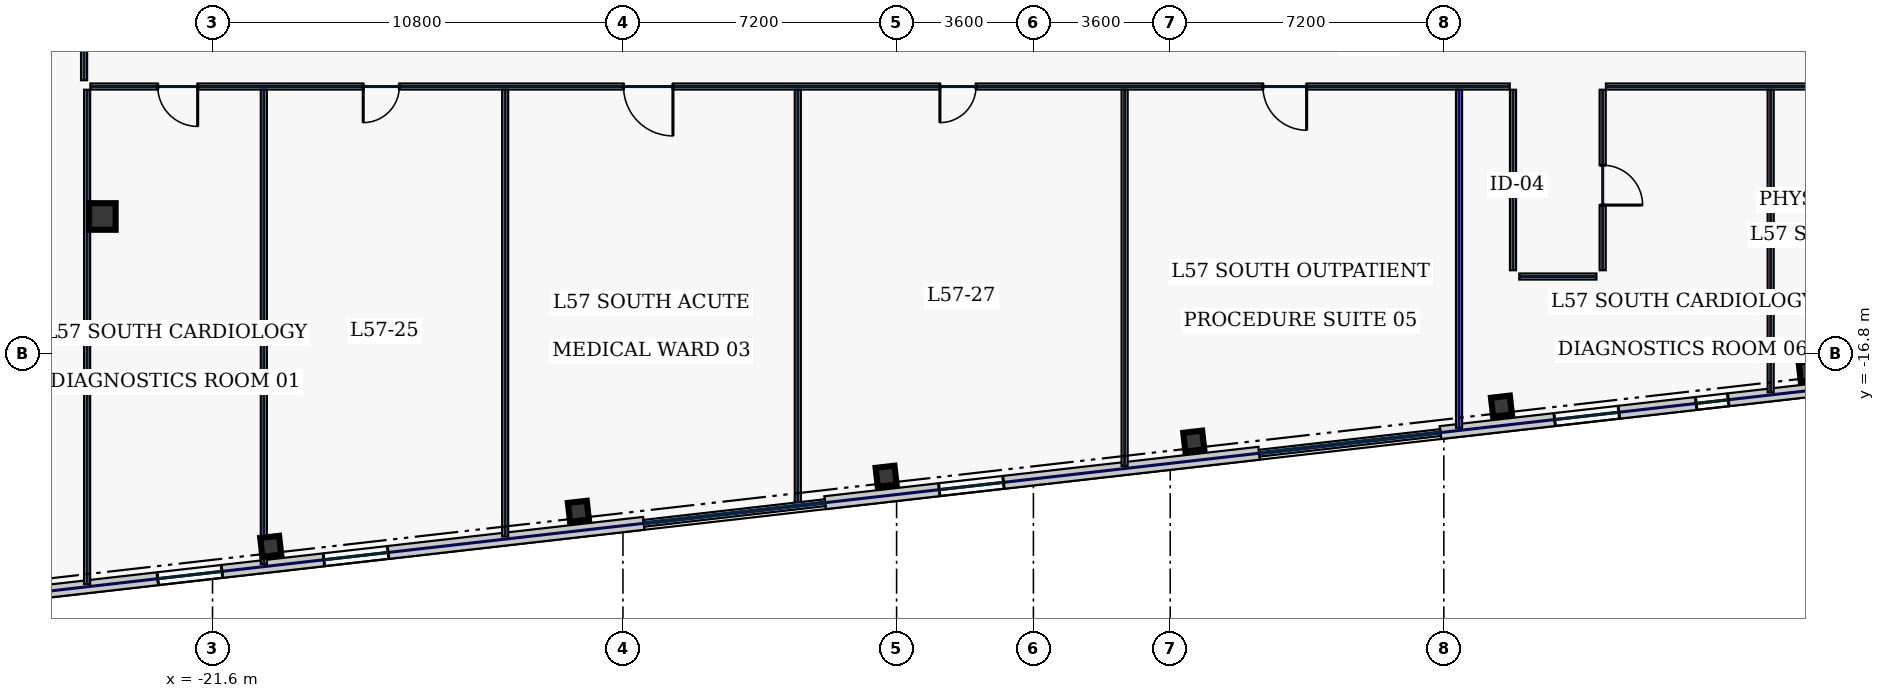
"""IFC4 building model, lengths in metres.
Left out: names, types, materials, properties, quantities, classifications, styles, units other than length and angle.
Written with IfcOpenShell. Run it as: python <this file> out.ifc"""

import sys

from ifc_helpers import new_model, si_unit, direction, frame, frame_2d, origin, origin_2d, place, context, subcontext, project, spatial, rectangle, hollow_rectangle, extrude, element, fill, save


model = new_model("IFC4")
c1 = context("Model", 3, precision=1e-05, world=origin(), true_north=direction((0.0, 1.0)))
c2 = subcontext(c1, "Body", "Model", "MODEL_VIEW")
j1 = project(units=[si_unit("LENGTHUNIT", "METRE"), si_unit("PLANEANGLEUNIT", "RADIAN")], contexts=[c1])
p1 = place(None, origin())
s1 = spatial("IfcSite", under=j1, at=p1, CompositionType="ELEMENT")
p2 = place(p1, origin())
s2 = spatial("IfcBuilding", under=s1, at=p2, CompositionType="ELEMENT")
p3 = place(p2, frame((0.0, 0.0, 247.0)))
s3 = spatial("IfcBuildingStorey", under=s2, at=p3, CompositionType="ELEMENT", Elevation=247.0)
p4 = place(p3, frame((-24.5, -13.2, 0.0), z_axis=(0.0, 0.0, 1.0), x_axis=(1.0, 0.0, 0.0)))
e1 = element("IfcColumn", 1, at=p4, inside=s3, PredefinedType="COLUMN", context=c2, shape_type="SweptSolid", body=[
    extrude(hollow_rectangle(XDim=0.7, YDim=0.7, WallThickness=0.032, at=origin_2d()), origin(), (0.0, 0.0, 1.0), 3.74),
])
for number, where, z_axis, x_axis in (
    (2, (-20.069, -21.88, 0.0), (0.0, 0.0, 1.0), (0.994, 0.113, 0.0)),
    (3, (-11.972, -20.958, 0.0), (0.0, 0.0, 1.0), (0.994, 0.113, 0.0)),
    (4, (-3.876, -20.035, 0.0), (0.0, 0.0, 1.0), (0.994, 0.113, 0.0)),
    (5, (4.22, -19.113, 0.0), (0.0, 0.0, 1.0), (0.994, 0.113, 0.0)),
    (6, (12.316, -18.19, 0.0), (0.0, 0.0, 1.0), (0.994, 0.113, 0.0)),
    (7, (20.412, -17.268, 0.0), (0.0, 0.0, 1.0), (0.994, 0.113, 0.0)),
):
    element("IfcColumn", number, at=place(p3, frame(where, z_axis=z_axis, x_axis=x_axis)), inside=s3, PredefinedType="COLUMN", context=c2, shape_type="SweptSolid", body=[
        extrude(hollow_rectangle(XDim=0.5, YDim=0.5, WallThickness=0.025, at=origin_2d()), origin(), (0.0, 0.0, 1.0), 3.74),
    ])
p5 = place(p3, frame((-28.783, -23.386, 0.0), z_axis=(0.0, 0.0, 1.0), x_axis=(0.993572271362, 0.113199565282, 0.0)))
e8 = element("IfcWall", 8, at=p5, inside=s3, PredefinedType="STANDARD", context=c2, shape_type="SweptSolid", body=[
    extrude(rectangle(XDim=18.651, YDim=0.34, at=frame_2d((9.326, 0.0))), origin(), (0.0, 0.0, 1.0), 3.74),
])
p6 = place(p5, frame((2.03, 0.0, 0.88)))
e9 = element("IfcOpeningElement", 9, at=p6, cuts=e8, PredefinedType="OPENING", context=c2, shape_type="SweptSolid", body=[
    extrude(rectangle(XDim=0.85, YDim=1.85, at=frame_2d((0.425, 0.925))), frame((0.0, 0.18, 0.0), z_axis=(0.0, -1.0, 0.0), x_axis=(1.0, 0.0, 0.0)), (0.0, 0.0, 1.0), 0.36),
])
p7 = place(p5, frame((5.779, 0.0, 0.88)))
e10 = element("IfcOpeningElement", 10, at=p7, cuts=e8, PredefinedType="OPENING", context=c2, shape_type="SweptSolid", body=[
    extrude(rectangle(XDim=1.7, YDim=1.95, at=frame_2d((0.85, 0.975))), frame((0.0, 0.18, 0.0), z_axis=(0.0, -1.0, 0.0), x_axis=(1.0, 0.0, 0.0)), (0.0, 0.0, 1.0), 0.36),
])
p8 = place(p5, frame((10.179, 0.0, 0.88)))
e11 = element("IfcOpeningElement", 11, at=p8, cuts=e8, PredefinedType="OPENING", context=c2, shape_type="SweptSolid", body=[
    extrude(rectangle(XDim=1.7, YDim=1.95, at=frame_2d((0.85, 0.975))), frame((0.0, 0.18, 0.0), z_axis=(0.0, -1.0, 0.0), x_axis=(1.0, 0.0, 0.0)), (0.0, 0.0, 1.0), 0.36),
])
p9 = place(p3, frame((-5.482, -20.731, 0.0), z_axis=(0.0, 0.0, 1.0), x_axis=(0.993571968199, 0.113202226169, 0.0)))
e12 = element("IfcWall", 12, at=p9, inside=s3, PredefinedType="STANDARD", context=c2, shape_type="SweptSolid", body=[
    extrude(rectangle(XDim=11.497, YDim=0.34, at=frame_2d((5.749, 0.0))), origin(), (0.0, 0.0, 1.0), 3.74),
])
p10 = place(p9, frame((3.024, 0.0, 0.88)))
e13 = element("IfcOpeningElement", 13, at=p10, cuts=e12, PredefinedType="OPENING", context=c2, shape_type="SweptSolid", body=[
    extrude(rectangle(XDim=1.7, YDim=1.95, at=frame_2d((0.85, 0.975))), frame((0.0, 0.18, 0.0), z_axis=(0.0, -1.0, 0.0), x_axis=(1.0, 0.0, 0.0)), (0.0, 0.0, 1.0), 0.36),
])
p11 = place(p3, frame((10.71, -18.886, 0.0), z_axis=(0.0, 0.0, 1.0), x_axis=(0.993572271362, 0.113199565282, 0.0)))
e14 = element("IfcWall", 14, at=p11, inside=s3, PredefinedType="STANDARD", context=c2, shape_type="SweptSolid", body=[
    extrude(rectangle(XDim=18.651, YDim=0.34, at=frame_2d((9.326, 0.0))), origin(), (0.0, 0.0, 1.0), 3.74),
])
p12 = place(p11, frame((3.024, 0.0, 0.88)))
e15 = element("IfcOpeningElement", 15, at=p12, cuts=e14, PredefinedType="OPENING", context=c2, shape_type="SweptSolid", body=[
    extrude(rectangle(XDim=1.7, YDim=1.95, at=frame_2d((0.85, 0.975))), frame((0.0, 0.18, 0.0), z_axis=(0.0, -1.0, 0.0), x_axis=(1.0, 0.0, 0.0)), (0.0, 0.0, 1.0), 0.36),
])
p13 = place(p11, frame((6.773, 0.0, 0.88)))
e16 = element("IfcOpeningElement", 16, at=p13, cuts=e14, PredefinedType="OPENING", context=c2, shape_type="SweptSolid", body=[
    extrude(rectangle(XDim=0.85, YDim=1.85, at=frame_2d((0.425, 0.925))), frame((0.0, 0.18, 0.0), z_axis=(0.0, -1.0, 0.0), x_axis=(1.0, 0.0, 0.0)), (0.0, 0.0, 1.0), 0.36),
])
p14 = place(p11, frame((11.173, 0.0, 0.88)))
e17 = element("IfcOpeningElement", 17, at=p14, cuts=e14, PredefinedType="OPENING", context=c2, shape_type="SweptSolid", body=[
    extrude(rectangle(XDim=1.7, YDim=1.95, at=frame_2d((0.85, 0.975))), frame((0.0, 0.18, 0.0), z_axis=(0.0, -1.0, 0.0), x_axis=(1.0, 0.0, 0.0)), (0.0, 0.0, 1.0), 0.36),
])
p15 = place(p11, frame((14.921, 0.0, 0.88)))
e18 = element("IfcOpeningElement", 18, at=p15, cuts=e14, PredefinedType="OPENING", context=c2, shape_type="SweptSolid", body=[
    extrude(rectangle(XDim=1.7, YDim=1.95, at=frame_2d((0.85, 0.975))), frame((0.0, 0.18, 0.0), z_axis=(0.0, -1.0, 0.0), x_axis=(1.0, 0.0, 0.0)), (0.0, 0.0, 1.0), 0.36),
])
p16 = place(p3, frame((-24.98, -9.615, 0.0), z_axis=(0.0, 0.0, 1.0), x_axis=(0.0, 1.0, 0.0)))
e19 = element("IfcWall", 19, at=p16, inside=s3, PredefinedType="PARTITIONING", context=c2, shape_type="SweptSolid", body=[
    extrude(rectangle(XDim=19.28, YDim=0.16, at=frame_2d((9.64, 0.0))), origin(), (0.0, 0.0, 1.0), 3.74),
])
p17 = place(p16, frame((1.969, 0.0, 0.0)))
e20 = element("IfcOpeningElement", 20, at=p17, cuts=e19, PredefinedType="OPENING", context=c2, shape_type="SweptSolid", body=[
    extrude(rectangle(XDim=0.95, YDim=2.2, at=frame_2d((0.475, 1.1))), frame((0.0, 0.09, 0.0), z_axis=(0.0, -1.0, 0.0), x_axis=(1.0, 0.0, 0.0)), (0.0, 0.0, 1.0), 0.18),
])
p18 = place(p16, frame((6.625, 0.0, 0.0)))
e21 = element("IfcOpeningElement", 21, at=p18, cuts=e19, PredefinedType="OPENING", context=c2, shape_type="SweptSolid", body=[
    extrude(rectangle(XDim=0.95, YDim=2.2, at=frame_2d((0.475, 1.1))), frame((0.0, 0.09, 0.0), z_axis=(0.0, -1.0, 0.0), x_axis=(1.0, 0.0, 0.0)), (0.0, 0.0, 1.0), 0.18),
])
p19 = place(p16, frame((11.825, 0.0, 0.0)))
e22 = element("IfcOpeningElement", 22, at=p19, cuts=e19, PredefinedType="OPENING", context=c2, shape_type="SweptSolid", body=[
    extrude(rectangle(XDim=0.95, YDim=2.2, at=frame_2d((0.475, 1.1))), frame((0.0, 0.09, 0.0), z_axis=(0.0, -1.0, 0.0), x_axis=(1.0, 0.0, 0.0)), (0.0, 0.0, 1.0), 0.18),
])
p20 = place(p16, frame((16.506, 0.0, 0.0)))
e23 = element("IfcOpeningElement", 23, at=p20, cuts=e19, PredefinedType="OPENING", context=c2, shape_type="SweptSolid", body=[
    extrude(rectangle(XDim=0.95, YDim=2.2, at=frame_2d((0.475, 1.1))), frame((0.0, 0.09, 0.0), z_axis=(0.0, -1.0, 0.0), x_axis=(1.0, 0.0, 0.0)), (0.0, 0.0, 1.0), 0.18),
])
p21 = place(p3, frame((24.815, -9.78, 0.0), z_axis=(0.0, 0.0, 1.0), x_axis=(-1.0, 0.0, 0.0)))
e24 = element("IfcWall", 24, at=p21, inside=s3, PredefinedType="PARTITIONING", context=c2, shape_type="SweptSolid", body=[
    extrude(rectangle(XDim=9.75, YDim=0.16, at=frame_2d((4.875, 0.0))), origin(), (0.0, 0.0, 1.0), 3.74),
])
p22 = place(p21, frame((2.469, 0.0, 0.0)))
e25 = element("IfcOpeningElement", 25, at=p22, cuts=e24, PredefinedType="OPENING", context=c2, shape_type="SweptSolid", body=[
    extrude(rectangle(XDim=0.95, YDim=2.2, at=frame_2d((0.475, 1.1))), frame((0.0, 0.09, 0.0), z_axis=(0.0, -1.0, 0.0), x_axis=(1.0, 0.0, 0.0)), (0.0, 0.0, 1.0), 0.18),
])
p23 = place(p3, frame((14.98, -9.865, 0.0), z_axis=(0.0, 0.0, 1.0), x_axis=(0.0, -1.0, 0.0)))
e26 = element("IfcWall", 26, at=p23, inside=s3, PredefinedType="PARTITIONING", context=c2, shape_type="SweptSolid", body=[
    extrude(rectangle(XDim=4.75, YDim=0.16, at=frame_2d((2.375, 0.0))), origin(), (0.0, 0.0, 1.0), 3.74),
])
p24 = place(p23, frame((1.985, 0.0, 0.0)))
e27 = element("IfcOpeningElement", 27, at=p24, cuts=e26, PredefinedType="OPENING", context=c2, shape_type="SweptSolid", body=[
    extrude(rectangle(XDim=1.05, YDim=2.2, at=frame_2d((0.525, 1.1))), frame((0.0, 0.09, 0.0), z_axis=(0.0, -1.0, 0.0), x_axis=(1.0, 0.0, 0.0)), (0.0, 0.0, 1.0), 0.18),
])
p25 = place(p3, frame((14.815, -14.78, 0.0), z_axis=(0.0, 0.0, 1.0), x_axis=(-1.0, 0.0, 0.0)))
e28 = element("IfcWall", 28, at=p25, inside=s3, PredefinedType="PARTITIONING", context=c2, shape_type="SweptSolid", body=[
    extrude(rectangle(XDim=2.03, YDim=0.16, at=frame_2d((1.015, 0.0))), origin(), (0.0, 0.0, 1.0), 3.74),
])
p26 = place(p3, frame((12.62, -14.615, 0.0), z_axis=(0.0, 0.0, 1.0), x_axis=(0.0, 1.0, 0.0)))
e29 = element("IfcWall", 29, at=p26, inside=s3, PredefinedType="PARTITIONING", context=c2, shape_type="SweptSolid", body=[
    extrude(rectangle(XDim=4.75, YDim=0.16, at=frame_2d((2.375, 0.0))), origin(), (0.0, 0.0, 1.0), 3.74),
])
p27 = place(p3, frame((12.535, -9.78, 0.0), z_axis=(0.0, 0.0, 1.0), x_axis=(-1.0, 0.0, 0.0)))
e30 = element("IfcWall", 30, at=p27, inside=s3, PredefinedType="PARTITIONING", context=c2, shape_type="SweptSolid", body=[
    extrude(rectangle(XDim=37.35, YDim=0.16, at=frame_2d((18.675, 0.0))), origin(), (0.0, 0.0, 1.0), 3.74),
])
p28 = place(p27, frame((34.526, 0.0, 0.0)))
e31 = element("IfcOpeningElement", 31, at=p28, cuts=e30, PredefinedType="OPENING", context=c2, shape_type="SweptSolid", body=[
    extrude(rectangle(XDim=1.05, YDim=2.2, at=frame_2d((0.525, 1.1))), frame((0.0, 0.09, 0.0), z_axis=(0.0, -1.0, 0.0), x_axis=(1.0, 0.0, 0.0)), (0.0, 0.0, 1.0), 0.18),
])
p29 = place(p27, frame((29.22, 0.0, 0.0)))
e32 = element("IfcOpeningElement", 32, at=p29, cuts=e30, PredefinedType="OPENING", context=c2, shape_type="SweptSolid", body=[
    extrude(rectangle(XDim=0.95, YDim=2.2, at=frame_2d((0.475, 1.1))), frame((0.0, 0.09, 0.0), z_axis=(0.0, -1.0, 0.0), x_axis=(1.0, 0.0, 0.0)), (0.0, 0.0, 1.0), 0.18),
])
p30 = place(p27, frame((22.02, 0.0, 0.0)))
e33 = element("IfcOpeningElement", 33, at=p30, cuts=e30, PredefinedType="OPENING", context=c2, shape_type="SweptSolid", body=[
    extrude(rectangle(XDim=1.3, YDim=2.2, at=frame_2d((0.65, 1.1))), frame((0.0, 0.09, 0.0), z_axis=(0.0, -1.0, 0.0), x_axis=(1.0, 0.0, 0.0)), (0.0, 0.0, 1.0), 0.18),
])
p31 = place(p27, frame((14.045, 0.0, 0.0)))
e34 = element("IfcOpeningElement", 34, at=p31, cuts=e30, PredefinedType="OPENING", context=c2, shape_type="SweptSolid", body=[
    extrude(rectangle(XDim=0.95, YDim=2.2, at=frame_2d((0.475, 1.1))), frame((0.0, 0.09, 0.0), z_axis=(0.0, -1.0, 0.0), x_axis=(1.0, 0.0, 0.0)), (0.0, 0.0, 1.0), 0.18),
])
p32 = place(p27, frame((5.345, 0.0, 0.0)))
e35 = element("IfcOpeningElement", 35, at=p32, cuts=e30, PredefinedType="OPENING", context=c2, shape_type="SweptSolid", body=[
    extrude(rectangle(XDim=1.15, YDim=2.2, at=frame_2d((0.575, 1.1))), frame((0.0, 0.09, 0.0), z_axis=(0.0, -1.0, 0.0), x_axis=(1.0, 0.0, 0.0)), (0.0, 0.0, 1.0), 0.18),
])
p33 = place(p3, frame((-24.9, -22.873, 0.0), z_axis=(0.0, 0.0, 1.0), x_axis=(0.0, 1.0, 0.0)))
e36 = element("IfcWall", 36, at=p33, inside=s3, PredefinedType="PARTITIONING", context=c2, shape_type="SweptSolid", body=[
    extrude(rectangle(XDim=13.008, YDim=0.16, at=frame_2d((6.504, 0.0))), origin(), (0.0, 0.0, 1.0), 3.74),
])
p34 = place(p3, frame((-20.25, -22.344, 0.0), z_axis=(0.0, 0.0, 1.0), x_axis=(0.0, 1.0, 0.0)))
e37 = element("IfcWall", 37, at=p34, inside=s3, PredefinedType="PARTITIONING", context=c2, shape_type="SweptSolid", body=[
    extrude(rectangle(XDim=12.479, YDim=0.16, at=frame_2d((6.239, 0.0))), origin(), (0.0, 0.0, 1.0), 3.74),
])
p35 = place(p3, frame((-13.9, -21.62, 0.0), z_axis=(0.0, 0.0, 1.0), x_axis=(0.0, 1.0, 0.0)))
e38 = element("IfcWall", 38, at=p35, inside=s3, PredefinedType="PARTITIONING", context=c2, shape_type="SweptSolid", body=[
    extrude(rectangle(XDim=11.755, YDim=0.16, at=frame_2d((5.877, 0.0))), origin(), (0.0, 0.0, 1.0), 3.74),
])
p36 = place(p3, frame((-6.2, -20.743, 0.0), z_axis=(0.0, 0.0, 1.0), x_axis=(0.0, 1.0, 0.0)))
e39 = element("IfcWall", 39, at=p36, inside=s3, PredefinedType="PARTITIONING", context=c2, shape_type="SweptSolid", body=[
    extrude(rectangle(XDim=10.878, YDim=0.16, at=frame_2d((5.439, 0.0))), origin(), (0.0, 0.0, 1.0), 3.74),
])
p37 = place(p3, frame((2.4, -19.763, 0.0), z_axis=(0.0, 0.0, 1.0), x_axis=(0.0, 1.0, 0.0)))
e40 = element("IfcWall", 40, at=p37, inside=s3, PredefinedType="PARTITIONING", context=c2, shape_type="SweptSolid", body=[
    extrude(rectangle(XDim=9.898, YDim=0.16, at=frame_2d((4.949, 0.0))), origin(), (0.0, 0.0, 1.0), 3.74),
])
p38 = place(p3, frame((11.2, -18.76, 0.0), z_axis=(0.0, 0.0, 1.0), x_axis=(0.0, 1.0, 0.0)))
e41 = element("IfcWall", 41, at=p38, inside=s3, PredefinedType="PARTITIONING", context=c2, shape_type="SweptSolid", body=[
    extrude(rectangle(XDim=8.895, YDim=0.16, at=frame_2d((4.448, 0.0))), origin(), (0.0, 0.0, 1.0), 3.285),
])
p39 = place(p3, frame((19.4, -17.826, 0.0), z_axis=(0.0, 0.0, 1.0), x_axis=(0.0, 1.0, 0.0)))
e42 = element("IfcWall", 42, at=p39, inside=s3, PredefinedType="PARTITIONING", context=c2, shape_type="SweptSolid", body=[
    extrude(rectangle(XDim=7.961, YDim=0.16, at=frame_2d((3.98, 0.0))), origin(), (0.0, 0.0, 1.0), 3.74),
])
p40 = place(p7, origin())
e43 = element("IfcWindow", 43, at=p40, inside=s3, PartitioningType="SINGLE_PANEL", PredefinedType="WINDOW", context=c2, shape_type="SweptSolid", body=[
    extrude(rectangle(XDim=1.7, YDim=1.95, at=frame_2d((0.85, 0.975))), frame((0.0, 0.03, 0.0), z_axis=(0.0, -1.0, 0.0), x_axis=(1.0, 0.0, 0.0)), (0.0, 0.0, 1.0), 0.06),
])
fill(e10, e43)
p41 = place(p8, origin())
e44 = element("IfcWindow", 44, at=p41, inside=s3, PartitioningType="SINGLE_PANEL", PredefinedType="WINDOW", context=c2, shape_type="SweptSolid", body=[
    extrude(rectangle(XDim=1.7, YDim=1.95, at=frame_2d((0.85, 0.975))), frame((0.0, 0.03, 0.0), z_axis=(0.0, -1.0, 0.0), x_axis=(1.0, 0.0, 0.0)), (0.0, 0.0, 1.0), 0.06),
])
fill(e11, e44)
p42 = place(p10, origin())
e45 = element("IfcWindow", 45, at=p42, inside=s3, PartitioningType="SINGLE_PANEL", PredefinedType="WINDOW", context=c2, shape_type="SweptSolid", body=[
    extrude(rectangle(XDim=1.7, YDim=1.95, at=frame_2d((0.85, 0.975))), frame((0.0, 0.03, 0.0), z_axis=(0.0, -1.0, 0.0), x_axis=(1.0, 0.0, 0.0)), (0.0, 0.0, 1.0), 0.06),
])
fill(e13, e45)
p43 = place(p12, origin())
e46 = element("IfcWindow", 46, at=p43, inside=s3, PartitioningType="SINGLE_PANEL", PredefinedType="WINDOW", context=c2, shape_type="SweptSolid", body=[
    extrude(rectangle(XDim=1.7, YDim=1.95, at=frame_2d((0.85, 0.975))), frame((0.0, 0.03, 0.0), z_axis=(0.0, -1.0, 0.0), x_axis=(1.0, 0.0, 0.0)), (0.0, 0.0, 1.0), 0.06),
])
fill(e15, e46)
p44 = place(p13, origin())
e47 = element("IfcWindow", 47, at=p44, inside=s3, PartitioningType="SINGLE_PANEL", PredefinedType="WINDOW", context=c2, shape_type="SweptSolid", body=[
    extrude(rectangle(XDim=0.85, YDim=1.85, at=frame_2d((0.425, 0.925))), frame((0.0, 0.03, 0.0), z_axis=(0.0, -1.0, 0.0), x_axis=(1.0, 0.0, 0.0)), (0.0, 0.0, 1.0), 0.06),
])
fill(e16, e47)
p45 = place(p28, origin())
e48 = element("IfcDoor", 48, at=p45, inside=s3, OperationType="SINGLE_SWING_LEFT", PredefinedType="DOOR", context=c2, shape_type="SweptSolid", body=[
    extrude(rectangle(XDim=1.05, YDim=2.2, at=frame_2d((0.525, 1.1))), frame((0.0, 0.025, 0.0), z_axis=(0.0, -1.0, 0.0), x_axis=(1.0, 0.0, 0.0)), (0.0, 0.0, 1.0), 0.05),
])
fill(e31, e48)
p46 = place(p29, origin())
e49 = element("IfcDoor", 49, at=p46, inside=s3, OperationType="SINGLE_SWING_RIGHT", PredefinedType="DOOR", context=c2, shape_type="SweptSolid", body=[
    extrude(rectangle(XDim=0.95, YDim=2.2, at=frame_2d((0.475, 1.1))), frame((0.0, 0.025, 0.0), z_axis=(0.0, -1.0, 0.0), x_axis=(1.0, 0.0, 0.0)), (0.0, 0.0, 1.0), 0.05),
])
fill(e32, e49)
p47 = place(p30, origin())
e50 = element("IfcDoor", 50, at=p47, inside=s3, OperationType="SINGLE_SWING_LEFT", PredefinedType="DOOR", context=c2, shape_type="SweptSolid", body=[
    extrude(rectangle(XDim=1.3, YDim=2.2, at=frame_2d((0.65, 1.1))), frame((0.0, 0.025, 0.0), z_axis=(0.0, -1.0, 0.0), x_axis=(1.0, 0.0, 0.0)), (0.0, 0.0, 1.0), 0.05),
])
fill(e33, e50)
p48 = place(p31, origin())
e51 = element("IfcDoor", 51, at=p48, inside=s3, OperationType="SINGLE_SWING_RIGHT", PredefinedType="DOOR", context=c2, shape_type="SweptSolid", body=[
    extrude(rectangle(XDim=0.95, YDim=2.2, at=frame_2d((0.475, 1.1))), frame((0.0, 0.025, 0.0), z_axis=(0.0, -1.0, 0.0), x_axis=(1.0, 0.0, 0.0)), (0.0, 0.0, 1.0), 0.05),
])
fill(e34, e51)
p49 = place(p32, origin())
e52 = element("IfcDoor", 52, at=p49, inside=s3, OperationType="SINGLE_SWING_LEFT", PredefinedType="DOOR", context=c2, shape_type="SweptSolid", body=[
    extrude(rectangle(XDim=1.15, YDim=2.2, at=frame_2d((0.575, 1.1))), frame((0.0, 0.025, 0.0), z_axis=(0.0, -1.0, 0.0), x_axis=(1.0, 0.0, 0.0)), (0.0, 0.0, 1.0), 0.05),
])
fill(e35, e52)
p50 = place(p24, origin())
e53 = element("IfcDoor", 53, at=p50, inside=s3, OperationType="SINGLE_SWING_RIGHT", PredefinedType="DOOR", context=c2, shape_type="SweptSolid", body=[
    extrude(rectangle(XDim=1.05, YDim=2.2, at=frame_2d((0.525, 1.1))), frame((0.0, 0.025, 0.0), z_axis=(0.0, -1.0, 0.0), x_axis=(1.0, 0.0, 0.0)), (0.0, 0.0, 1.0), 0.05),
])
fill(e27, e53)
save(model, sys.argv[1])
